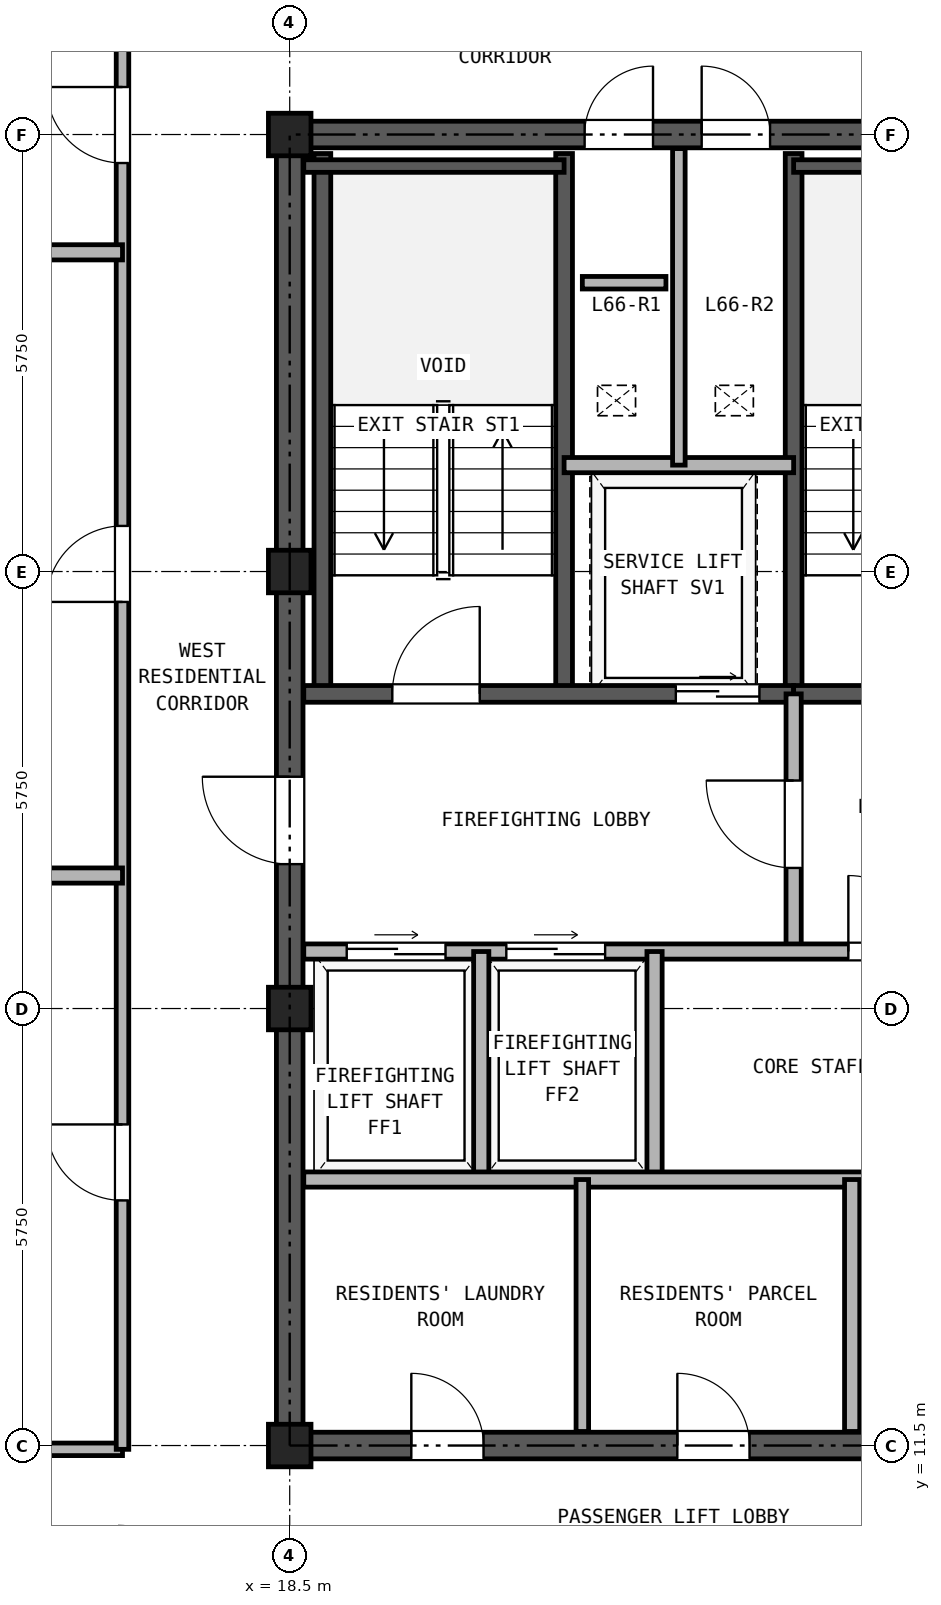
"""IFC4 building model, lengths in metres.
Left out: names, types, materials, properties, quantities, classifications, styles, units other than length and angle.
Written with IfcOpenShell. Run it as: python <this file> out.ifc"""

import sys

from ifc_helpers import new_model, si_unit, direction, frame, frame_2d, origin, origin_2d, place, context, subcontext, project, spatial, rectangle, hollow_rectangle, extrude, source, transform, mapped, element, fill, save


model = new_model("IFC4")
c1 = context("Model", 3, precision=1e-05, world=origin(), true_north=direction((0.0, 1.0)))
c2 = subcontext(c1, "Body", "Model", "MODEL_VIEW")
j1 = project(units=[si_unit("LENGTHUNIT", "METRE"), si_unit("PLANEANGLEUNIT", "RADIAN")], contexts=[c1])
p1 = place(None, origin())
s1 = spatial("IfcSite", under=j1, at=p1, CompositionType="ELEMENT")
p2 = place(p1, origin())
s2 = spatial("IfcBuilding", under=s1, at=p2, CompositionType="ELEMENT")
p3 = place(p2, frame((0.0, 0.0, 232.9)))
s3 = spatial("IfcBuildingStorey", under=s2, at=p3, CompositionType="ELEMENT", Elevation=232.9)
m1 = source(origin(), c2, "Body", "SweptSolid", [
    extrude(hollow_rectangle(XDim=0.56, YDim=0.56, WallThickness=0.03, at=origin_2d()), origin(), (0.0, 0.0, 1.0), 2.98),
])
for number, where, z_axis, x_axis in (
    (1, (18.5, 11.5, 0.0), (0.0, 0.0, 1.0), (1.0, 0.0, 0.0)),
    (2, (18.5, 17.25, 0.0), (0.0, 0.0, 1.0), (1.0, 0.0, 0.0)),
    (3, (18.5, 23.0, 0.0), (0.0, 0.0, 1.0), (1.0, 0.0, 0.0)),
    (4, (18.5, 28.75, 0.0), (0.0, 0.0, 1.0), (1.0, 0.0, 0.0)),
):
    element("IfcColumn", number, at=place(p3, frame(where, z_axis=z_axis, x_axis=x_axis)), inside=s3, PredefinedType="COLUMN", context=c2, shape_type="MappedRepresentation", body=[
        mapped(m1, transform((0.0, 0.0, 0.0), x_axis=(1.0, 0.0, 0.0), y_axis=(0.0, 1.0, 0.0), z_axis=(0.0, 0.0, 1.0), scale=1.0)),
    ])
p4 = place(p3, frame((18.325, 11.5, 0.0), z_axis=(0.0, 0.0, 1.0), x_axis=(1.0, 0.0, 0.0)))
e5 = element("IfcWall", 5, at=p4, inside=s3, PredefinedType="SHEAR", context=c2, shape_type="SweptSolid", body=[
    extrude(rectangle(XDim=10.35, YDim=0.35, at=frame_2d((5.175, 0.0))), origin(), (0.0, 0.0, 1.0), 2.98),
])
p5 = place(p4, frame((1.775, 0.0, 0.0)))
e6 = element("IfcOpeningElement", 6, at=p5, cuts=e5, PredefinedType="OPENING", context=c2, shape_type="SweptSolid", body=[
    extrude(rectangle(XDim=0.95, YDim=2.15, at=frame_2d((0.475, 1.075))), frame((0.0, 0.185, 0.0), z_axis=(0.0, -1.0, 0.0), x_axis=(1.0, 0.0, 0.0)), (0.0, 0.0, 1.0), 0.37),
])
p6 = place(p4, frame((5.275, 0.0, 0.0)))
e7 = element("IfcOpeningElement", 7, at=p6, cuts=e5, PredefinedType="OPENING", context=c2, shape_type="SweptSolid", body=[
    extrude(rectangle(XDim=0.95, YDim=2.15, at=frame_2d((0.475, 1.075))), frame((0.0, 0.185, 0.0), z_axis=(0.0, -1.0, 0.0), x_axis=(1.0, 0.0, 0.0)), (0.0, 0.0, 1.0), 0.37),
])
p7 = place(p4, frame((8.175, 0.0, 0.0)))
e8 = element("IfcOpeningElement", 8, at=p7, cuts=e5, PredefinedType="OPENING", context=c2, shape_type="SweptSolid", body=[
    extrude(rectangle(XDim=1.1, YDim=2.25, at=frame_2d((0.55, 1.125))), frame((0.0, 0.185, 0.0), z_axis=(0.0, -1.0, 0.0), x_axis=(1.0, 0.0, 0.0)), (0.0, 0.0, 1.0), 0.37),
])
p8 = place(p3, frame((18.325, 28.75, 0.0), z_axis=(0.0, 0.0, 1.0), x_axis=(1.0, 0.0, 0.0)))
e9 = element("IfcWall", 9, at=p8, inside=s3, PredefinedType="SHEAR", context=c2, shape_type="SweptSolid", body=[
    extrude(rectangle(XDim=10.35, YDim=0.35, at=frame_2d((5.175, 0.0))), origin(), (0.0, 0.0, 1.0), 2.98),
])
p9 = place(p8, frame((4.055, 0.0, 0.0)))
e10 = element("IfcOpeningElement", 10, at=p9, cuts=e9, PredefinedType="OPENING", context=c2, shape_type="SweptSolid", body=[
    extrude(rectangle(XDim=0.9, YDim=2.05, at=frame_2d((0.45, 1.025))), frame((0.0, 0.185, 0.0), z_axis=(0.0, -1.0, 0.0), x_axis=(1.0, 0.0, 0.0)), (0.0, 0.0, 1.0), 0.37),
])
p10 = place(p8, frame((5.595, 0.0, 0.0)))
e11 = element("IfcOpeningElement", 11, at=p10, cuts=e9, PredefinedType="OPENING", context=c2, shape_type="SweptSolid", body=[
    extrude(rectangle(XDim=0.9, YDim=2.05, at=frame_2d((0.45, 1.025))), frame((0.0, 0.185, 0.0), z_axis=(0.0, -1.0, 0.0), x_axis=(1.0, 0.0, 0.0)), (0.0, 0.0, 1.0), 0.37),
])
p11 = place(p3, frame((18.5, 11.675, 0.0), z_axis=(0.0, 0.0, 1.0), x_axis=(0.0, 1.0, 0.0)))
e12 = element("IfcWall", 12, at=p11, inside=s3, PredefinedType="SHEAR", context=c2, shape_type="SweptSolid", body=[
    extrude(rectangle(XDim=16.9, YDim=0.35, at=frame_2d((8.45, 0.0))), origin(), (0.0, 0.0, 1.0), 2.98),
])
p12 = place(p11, frame((7.475, 0.0, 0.0)))
e13 = element("IfcOpeningElement", 13, at=p12, cuts=e12, PredefinedType="OPENING", context=c2, shape_type="SweptSolid", body=[
    extrude(rectangle(XDim=1.15, YDim=2.2, at=frame_2d((0.575, 1.1))), frame((0.0, 0.185, 0.0), z_axis=(0.0, -1.0, 0.0), x_axis=(1.0, 0.0, 0.0)), (0.0, 0.0, 1.0), 0.37),
])
for number, where, z_axis, x_axis in (
    (14, (18.93, 21.39, 0.0), (0.0, 0.0, 1.0), (0.0, 1.0, 0.0)),
    (15, (22.11, 21.39, 0.0), (0.0, 0.0, 1.0), (0.0, 1.0, 0.0)),
    (16, (25.13, 21.39, 0.0), (0.0, 0.0, 1.0), (0.0, 1.0, 0.0)),
):
    element("IfcWall", number, at=place(p3, frame(where, z_axis=z_axis, x_axis=x_axis)), inside=s3, PredefinedType="SOLIDWALL", context=c2, shape_type="SweptSolid", body=[
        extrude(rectangle(XDim=7.11, YDim=0.22, at=frame_2d((3.555, 0.0))), origin(), (0.0, 0.0, 1.0), 2.98),
    ])
p13 = place(p3, frame((18.685, 28.335, 0.0), z_axis=(0.0, 0.0, 1.0), x_axis=(1.0, 0.0, 0.0)))
e17 = element("IfcWall", 17, at=p13, inside=s3, PredefinedType="PARTITIONING", context=c2, shape_type="SweptSolid", body=[
    extrude(rectangle(XDim=3.425, YDim=0.165, at=frame_2d((1.712, 0.0))), origin(), (0.0, 0.0, 1.0), 2.98),
])
p14 = place(p3, frame((25.13, 28.335, 0.0), z_axis=(0.0, 0.0, 1.0), x_axis=(1.0, 0.0, 0.0)))
e18 = element("IfcWall", 18, at=p14, inside=s3, PredefinedType="PARTITIONING", context=c2, shape_type="SweptSolid", body=[
    extrude(rectangle(XDim=3.185, YDim=0.165, at=frame_2d((1.593, 0.0))), origin(), (0.0, 0.0, 1.0), 2.98),
])
p15 = place(p3, frame((18.685, 21.39, 0.0), z_axis=(0.0, 0.0, 1.0), x_axis=(1.0, 0.0, 0.0)))
e19 = element("IfcWall", 19, at=p15, inside=s3, PredefinedType="SOLIDWALL", context=c2, shape_type="SweptSolid", body=[
    extrude(rectangle(XDim=6.445, YDim=0.22, at=frame_2d((3.222, 0.0))), origin(), (0.0, 0.0, 1.0), 2.98),
])
p16 = place(p15, frame((1.165, 0.0, 0.0)))
e20 = element("IfcOpeningElement", 20, at=p16, cuts=e19, PredefinedType="OPENING", context=c2, shape_type="SweptSolid", body=[
    extrude(rectangle(XDim=1.15, YDim=2.2, at=frame_2d((0.575, 1.1))), frame((0.0, 0.12, 0.0), z_axis=(0.0, -1.0, 0.0), x_axis=(1.0, 0.0, 0.0)), (0.0, 0.0, 1.0), 0.24),
])
p17 = place(p15, frame((4.895, 0.0, 0.0)))
e21 = element("IfcOpeningElement", 21, at=p17, cuts=e19, PredefinedType="OPENING", context=c2, shape_type="SweptSolid", body=[
    extrude(rectangle(XDim=1.1, YDim=2.25, at=frame_2d((0.55, 1.125))), frame((0.0, 0.12, 0.0), z_axis=(0.0, -1.0, 0.0), x_axis=(1.0, 0.0, 0.0)), (0.0, 0.0, 1.0), 0.24),
])
p18 = place(p3, frame((25.13, 21.39, 0.0), z_axis=(0.0, 0.0, 1.0), x_axis=(1.0, 0.0, 0.0)))
e22 = element("IfcWall", 22, at=p18, inside=s3, PredefinedType="SOLIDWALL", context=c2, shape_type="SweptSolid", body=[
    extrude(rectangle(XDim=3.185, YDim=0.22, at=frame_2d((1.593, 0.0))), origin(), (0.0, 0.0, 1.0), 2.98),
])
p19 = place(p18, frame((0.92, 0.0, 0.0)))
e23 = element("IfcOpeningElement", 23, at=p19, cuts=e22, PredefinedType="OPENING", context=c2, shape_type="SweptSolid", body=[
    extrude(rectangle(XDim=1.15, YDim=2.2, at=frame_2d((0.575, 1.1))), frame((0.0, 0.12, 0.0), z_axis=(0.0, -1.0, 0.0), x_axis=(1.0, 0.0, 0.0)), (0.0, 0.0, 1.0), 0.24),
])
p20 = place(p3, frame((22.11, 24.4, 0.0), z_axis=(0.0, 0.0, 1.0), x_axis=(1.0, 0.0, 0.0)))
e24 = element("IfcWall", 24, at=p20, inside=s3, PredefinedType="PARTITIONING", context=c2, shape_type="SweptSolid", body=[
    extrude(rectangle(XDim=3.02, YDim=0.2, at=frame_2d((1.51, 0.0))), origin(), (0.0, 0.0, 1.0), 2.98),
])
p21 = place(p3, frame((23.62, 24.4, 0.0), z_axis=(0.0, 0.0, 1.0), x_axis=(0.0, 1.0, 0.0)))
e25 = element("IfcWall", 25, at=p21, inside=s3, PredefinedType="PARTITIONING", context=c2, shape_type="SweptSolid", body=[
    extrude(rectangle(XDim=4.165, YDim=0.165, at=frame_2d((2.083, 0.0))), origin(), (0.0, 0.0, 1.0), 2.98),
])
p22 = place(p3, frame((25.13, 18.0, 0.0), z_axis=(0.0, 0.0, 1.0), x_axis=(0.0, 1.0, 0.0)))
e26 = element("IfcWall", 26, at=p22, inside=s3, PredefinedType="PARTITIONING", context=c2, shape_type="SweptSolid", body=[
    extrude(rectangle(XDim=3.39, YDim=0.2, at=frame_2d((1.695, 0.0))), origin(), (0.0, 0.0, 1.0), 2.98),
])
p23 = place(p22, frame((1.1, 0.0, 0.0)))
e27 = element("IfcOpeningElement", 27, at=p23, cuts=e26, PredefinedType="OPENING", context=c2, shape_type="SweptSolid", body=[
    extrude(rectangle(XDim=1.15, YDim=2.2, at=frame_2d((0.575, 1.1))), frame((0.0, 0.11, 0.0), z_axis=(0.0, -1.0, 0.0), x_axis=(1.0, 0.0, 0.0)), (0.0, 0.0, 1.0), 0.22),
])
p24 = place(p3, frame((18.685, 18.0, 0.0), z_axis=(0.0, 0.0, 1.0), x_axis=(1.0, 0.0, 0.0)))
e28 = element("IfcWall", 28, at=p24, inside=s3, PredefinedType="PARTITIONING", context=c2, shape_type="SweptSolid", body=[
    extrude(rectangle(XDim=9.63, YDim=0.2, at=frame_2d((4.815, 0.0))), origin(), (0.0, 0.0, 1.0), 2.98),
])
p25 = place(p24, frame((0.565, 0.0, 0.0)))
e29 = element("IfcOpeningElement", 29, at=p25, cuts=e28, PredefinedType="OPENING", context=c2, shape_type="SweptSolid", body=[
    extrude(rectangle(XDim=1.3, YDim=2.3, at=frame_2d((0.65, 1.15))), frame((0.0, 0.11, 0.0), z_axis=(0.0, -1.0, 0.0), x_axis=(1.0, 0.0, 0.0)), (0.0, 0.0, 1.0), 0.22),
])
p26 = place(p24, frame((2.665, 0.0, 0.0)))
e30 = element("IfcOpeningElement", 30, at=p26, cuts=e28, PredefinedType="OPENING", context=c2, shape_type="SweptSolid", body=[
    extrude(rectangle(XDim=1.3, YDim=2.3, at=frame_2d((0.65, 1.15))), frame((0.0, 0.11, 0.0), z_axis=(0.0, -1.0, 0.0), x_axis=(1.0, 0.0, 0.0)), (0.0, 0.0, 1.0), 0.22),
])
p27 = place(p24, frame((7.165, 0.0, 0.0)))
e31 = element("IfcOpeningElement", 31, at=p27, cuts=e28, PredefinedType="OPENING", context=c2, shape_type="SweptSolid", body=[
    extrude(rectangle(XDim=1.0, YDim=2.15, at=frame_2d((0.5, 1.075))), frame((0.0, 0.11, 0.0), z_axis=(0.0, -1.0, 0.0), x_axis=(1.0, 0.0, 0.0)), (0.0, 0.0, 1.0), 0.22),
])
for number, where, z_axis, x_axis in (
    (32, (21.02, 15.0, 0.0), (0.0, 0.0, 1.0), (0.0, 1.0, 0.0)),
    (33, (23.3, 15.0, 0.0), (0.0, 0.0, 1.0), (0.0, 1.0, 0.0)),
):
    element("IfcWall", number, at=place(p3, frame(where, z_axis=z_axis, x_axis=x_axis)), inside=s3, PredefinedType="PARTITIONING", context=c2, shape_type="SweptSolid", body=[
        extrude(rectangle(XDim=3.0, YDim=0.2, at=frame_2d((1.5, 0.0))), origin(), (0.0, 0.0, 1.0), 2.98),
    ])
p28 = place(p3, frame((18.685, 15.0, 0.0), z_axis=(0.0, 0.0, 1.0), x_axis=(1.0, 0.0, 0.0)))
e34 = element("IfcWall", 34, at=p28, inside=s3, PredefinedType="PARTITIONING", context=c2, shape_type="SweptSolid", body=[
    extrude(rectangle(XDim=9.63, YDim=0.2, at=frame_2d((4.815, 0.0))), origin(), (0.0, 0.0, 1.0), 2.98),
])
p29 = place(p3, frame((22.35, 11.685, 0.0), z_axis=(0.0, 0.0, 1.0), x_axis=(0.0, 1.0, 0.0)))
e35 = element("IfcWall", 35, at=p29, inside=s3, PredefinedType="PARTITIONING", context=c2, shape_type="SweptSolid", body=[
    extrude(rectangle(XDim=3.315, YDim=0.165, at=frame_2d((1.657, 0.0))), origin(), (0.0, 0.0, 1.0), 2.98),
])
p30 = place(p3, frame((25.9, 11.685, 0.0), z_axis=(0.0, 0.0, 1.0), x_axis=(0.0, 1.0, 0.0)))
e36 = element("IfcWall", 36, at=p30, inside=s3, PredefinedType="PARTITIONING", context=c2, shape_type="SweptSolid", body=[
    extrude(rectangle(XDim=3.315, YDim=0.2, at=frame_2d((1.657, 0.0))), origin(), (0.0, 0.0, 1.0), 2.98),
])
p31 = place(p3, frame((8.56, 11.45, 0.0), z_axis=(0.0, 0.0, 1.0), x_axis=(1.0, 0.0, 0.0)))
e37 = element("IfcWall", 37, at=p31, inside=s3, PredefinedType="PARTITIONING", context=c2, shape_type="SweptSolid", body=[
    extrude(rectangle(XDim=7.74, YDim=0.165, at=frame_2d((3.87, 0.0))), origin(), (0.0, 0.0, 1.0), 2.428),
])
p32 = place(p3, frame((16.3, 11.45, 0.0), z_axis=(0.0, 0.0, 1.0), x_axis=(0.0, 1.0, 0.0)))
e38 = element("IfcWall", 38, at=p32, inside=s3, PredefinedType="PARTITIONING", context=c2, shape_type="SweptSolid", body=[
    extrude(rectangle(XDim=23.69, YDim=0.165, at=frame_2d((11.845, 0.0))), origin(), (0.0, 0.0, 1.0), 2.98),
])
p33 = place(p32, frame((3.275, 0.0, 0.0)))
e39 = element("IfcOpeningElement", 39, at=p33, cuts=e38, PredefinedType="OPENING", context=c2, shape_type="SweptSolid", body=[
    extrude(rectangle(XDim=1.0, YDim=2.15, at=frame_2d((0.5, 1.075))), frame((0.0, 0.093, 0.0), z_axis=(0.0, -1.0, 0.0), x_axis=(1.0, 0.0, 0.0)), (0.0, 0.0, 1.0), 0.185),
])
p34 = place(p32, frame((11.15, 0.0, 0.0)))
e40 = element("IfcOpeningElement", 40, at=p34, cuts=e38, PredefinedType="OPENING", context=c2, shape_type="SweptSolid", body=[
    extrude(rectangle(XDim=1.0, YDim=2.15, at=frame_2d((0.5, 1.075))), frame((0.0, 0.093, 0.0), z_axis=(0.0, -1.0, 0.0), x_axis=(1.0, 0.0, 0.0)), (0.0, 0.0, 1.0), 0.185),
])
p35 = place(p32, frame((16.925, 0.0, 0.0)))
e41 = element("IfcOpeningElement", 41, at=p35, cuts=e38, PredefinedType="OPENING", context=c2, shape_type="SweptSolid", body=[
    extrude(rectangle(XDim=1.0, YDim=2.15, at=frame_2d((0.5, 1.075))), frame((0.0, 0.093, 0.0), z_axis=(0.0, -1.0, 0.0), x_axis=(1.0, 0.0, 0.0)), (0.0, 0.0, 1.0), 0.185),
])
for number, where, z_axis, x_axis in (
    (42, (5.36, 19.0, 0.0), (0.0, 0.0, 1.0), (1.0, 0.0, 0.0)),
    (43, (5.36, 27.2, 0.0), (0.0, 0.0, 1.0), (1.0, 0.0, 0.0)),
):
    element("IfcWall", number, at=place(p3, frame(where, z_axis=z_axis, x_axis=x_axis)), inside=s3, PredefinedType="PARTITIONING", context=c2, shape_type="SweptSolid", body=[
        extrude(rectangle(XDim=10.94, YDim=0.2, at=frame_2d((5.47, 0.0))), origin(), (0.0, 0.0, 1.0), 2.98),
    ])
p36 = place(p3, frame((22.35, 26.8, 0.0), z_axis=(0.0, 0.0, 1.0), x_axis=(1.0, 0.0, 0.0)))
e44 = element("IfcWall", 44, at=p36, inside=s3, PredefinedType="PARTITIONING", context=c2, shape_type="SweptSolid", body=[
    extrude(rectangle(XDim=1.1, YDim=0.165, at=frame_2d((0.55, 0.0))), origin(), (0.0, 0.0, 1.0), 2.98),
])
p37 = place(p16, frame((1.15, 0.0, 0.0), z_axis=(0.0, 0.0, 1.0), x_axis=(-1.0, 0.0, 0.0)))
e45 = element("IfcDoor", 45, at=p37, inside=s3, OperationType="SINGLE_SWING_RIGHT", PredefinedType="DOOR", context=c2, shape_type="SweptSolid", body=[
    extrude(rectangle(XDim=1.15, YDim=2.2, at=frame_2d((0.575, 1.1))), frame((0.0, 0.025, 0.0), z_axis=(0.0, -1.0, 0.0), x_axis=(1.0, 0.0, 0.0)), (0.0, 0.0, 1.0), 0.05),
])
fill(e20, e45)
p38 = place(p17, frame((1.1, 0.0, 0.0), z_axis=(0.0, 0.0, 1.0), x_axis=(-1.0, 0.0, 0.0)))
e46 = element("IfcDoor", 46, at=p38, inside=s3, OperationType="DOUBLE_DOOR_SLIDING", PredefinedType="DOOR", context=c2, shape_type="SweptSolid", body=[
    extrude(rectangle(XDim=1.1, YDim=2.25, at=frame_2d((0.55, 1.125))), frame((0.0, 0.025, 0.0), z_axis=(0.0, -1.0, 0.0), x_axis=(1.0, 0.0, 0.0)), (0.0, 0.0, 1.0), 0.05),
])
fill(e21, e46)
p39 = place(p23, origin())
e47 = element("IfcDoor", 47, at=p39, inside=s3, OperationType="SINGLE_SWING_RIGHT", PredefinedType="DOOR", context=c2, shape_type="SweptSolid", body=[
    extrude(rectangle(XDim=1.15, YDim=2.2, at=frame_2d((0.575, 1.1))), frame((0.0, 0.025, 0.0), z_axis=(0.0, -1.0, 0.0), x_axis=(1.0, 0.0, 0.0)), (0.0, 0.0, 1.0), 0.05),
])
fill(e27, e47)
p40 = place(p25, origin())
e48 = element("IfcDoor", 48, at=p40, inside=s3, OperationType="DOUBLE_DOOR_SLIDING", PredefinedType="DOOR", context=c2, shape_type="SweptSolid", body=[
    extrude(rectangle(XDim=1.3, YDim=2.3, at=frame_2d((0.65, 1.15))), frame((0.0, 0.025, 0.0), z_axis=(0.0, -1.0, 0.0), x_axis=(1.0, 0.0, 0.0)), (0.0, 0.0, 1.0), 0.05),
])
fill(e29, e48)
p41 = place(p26, origin())
e49 = element("IfcDoor", 49, at=p41, inside=s3, OperationType="DOUBLE_DOOR_SLIDING", PredefinedType="DOOR", context=c2, shape_type="SweptSolid", body=[
    extrude(rectangle(XDim=1.3, YDim=2.3, at=frame_2d((0.65, 1.15))), frame((0.0, 0.025, 0.0), z_axis=(0.0, -1.0, 0.0), x_axis=(1.0, 0.0, 0.0)), (0.0, 0.0, 1.0), 0.05),
])
fill(e30, e49)
p42 = place(p27, frame((1.0, 0.0, 0.0), z_axis=(0.0, 0.0, 1.0), x_axis=(-1.0, 0.0, 0.0)))
e50 = element("IfcDoor", 50, at=p42, inside=s3, OperationType="SINGLE_SWING_LEFT", PredefinedType="DOOR", context=c2, shape_type="SweptSolid", body=[
    extrude(rectangle(XDim=1.0, YDim=2.15, at=frame_2d((0.5, 1.075))), frame((0.0, 0.025, 0.0), z_axis=(0.0, -1.0, 0.0), x_axis=(1.0, 0.0, 0.0)), (0.0, 0.0, 1.0), 0.05),
])
fill(e31, e50)
p43 = place(p12, frame((1.15, 0.0, 0.0), z_axis=(0.0, 0.0, 1.0), x_axis=(-1.0, 0.0, 0.0)))
e51 = element("IfcDoor", 51, at=p43, inside=s3, OperationType="SINGLE_SWING_RIGHT", PredefinedType="DOOR", context=c2, shape_type="SweptSolid", body=[
    extrude(rectangle(XDim=1.15, YDim=2.2, at=frame_2d((0.575, 1.1))), frame((0.0, 0.025, 0.0), z_axis=(0.0, -1.0, 0.0), x_axis=(1.0, 0.0, 0.0)), (0.0, 0.0, 1.0), 0.05),
])
fill(e13, e51)
p44 = place(p9, origin())
e52 = element("IfcDoor", 52, at=p44, inside=s3, OperationType="SINGLE_SWING_RIGHT", PredefinedType="DOOR", context=c2, shape_type="SweptSolid", body=[
    extrude(rectangle(XDim=0.9, YDim=2.05, at=frame_2d((0.45, 1.025))), frame((0.0, 0.025, 0.0), z_axis=(0.0, -1.0, 0.0), x_axis=(1.0, 0.0, 0.0)), (0.0, 0.0, 1.0), 0.05),
])
fill(e10, e52)
p45 = place(p10, origin())
e53 = element("IfcDoor", 53, at=p45, inside=s3, OperationType="SINGLE_SWING_LEFT", PredefinedType="DOOR", context=c2, shape_type="SweptSolid", body=[
    extrude(rectangle(XDim=0.9, YDim=2.05, at=frame_2d((0.45, 1.025))), frame((0.0, 0.025, 0.0), z_axis=(0.0, -1.0, 0.0), x_axis=(1.0, 0.0, 0.0)), (0.0, 0.0, 1.0), 0.05),
])
fill(e11, e53)
p46 = place(p5, frame((0.95, 0.0, 0.0), z_axis=(0.0, 0.0, 1.0), x_axis=(-1.0, 0.0, 0.0)))
e54 = element("IfcDoor", 54, at=p46, inside=s3, OperationType="SINGLE_SWING_LEFT", PredefinedType="DOOR", context=c2, shape_type="SweptSolid", body=[
    extrude(rectangle(XDim=0.95, YDim=2.15, at=frame_2d((0.475, 1.075))), frame((0.0, 0.025, 0.0), z_axis=(0.0, -1.0, 0.0), x_axis=(1.0, 0.0, 0.0)), (0.0, 0.0, 1.0), 0.05),
])
fill(e6, e54)
p47 = place(p6, frame((0.95, 0.0, 0.0), z_axis=(0.0, 0.0, 1.0), x_axis=(-1.0, 0.0, 0.0)))
e55 = element("IfcDoor", 55, at=p47, inside=s3, OperationType="SINGLE_SWING_LEFT", PredefinedType="DOOR", context=c2, shape_type="SweptSolid", body=[
    extrude(rectangle(XDim=0.95, YDim=2.15, at=frame_2d((0.475, 1.075))), frame((0.0, 0.025, 0.0), z_axis=(0.0, -1.0, 0.0), x_axis=(1.0, 0.0, 0.0)), (0.0, 0.0, 1.0), 0.05),
])
fill(e7, e55)
p48 = place(p33, origin())
e56 = element("IfcDoor", 56, at=p48, inside=s3, OperationType="SINGLE_SWING_RIGHT", PredefinedType="DOOR", context=c2, shape_type="SweptSolid", body=[
    extrude(rectangle(XDim=1.0, YDim=2.15, at=frame_2d((0.5, 1.075))), frame((0.0, 0.025, 0.0), z_axis=(0.0, -1.0, 0.0), x_axis=(1.0, 0.0, 0.0)), (0.0, 0.0, 1.0), 0.05),
])
fill(e39, e56)
p49 = place(p34, origin())
e57 = element("IfcDoor", 57, at=p49, inside=s3, OperationType="SINGLE_SWING_LEFT", PredefinedType="DOOR", context=c2, shape_type="SweptSolid", body=[
    extrude(rectangle(XDim=1.0, YDim=2.15, at=frame_2d((0.5, 1.075))), frame((0.0, 0.025, 0.0), z_axis=(0.0, -1.0, 0.0), x_axis=(1.0, 0.0, 0.0)), (0.0, 0.0, 1.0), 0.05),
])
fill(e40, e57)
p50 = place(p35, origin())
e58 = element("IfcDoor", 58, at=p50, inside=s3, OperationType="SINGLE_SWING_RIGHT", PredefinedType="DOOR", context=c2, shape_type="SweptSolid", body=[
    extrude(rectangle(XDim=1.0, YDim=2.15, at=frame_2d((0.5, 1.075))), frame((0.0, 0.025, 0.0), z_axis=(0.0, -1.0, 0.0), x_axis=(1.0, 0.0, 0.0)), (0.0, 0.0, 1.0), 0.05),
])
fill(e41, e58)
save(model, sys.argv[1])
